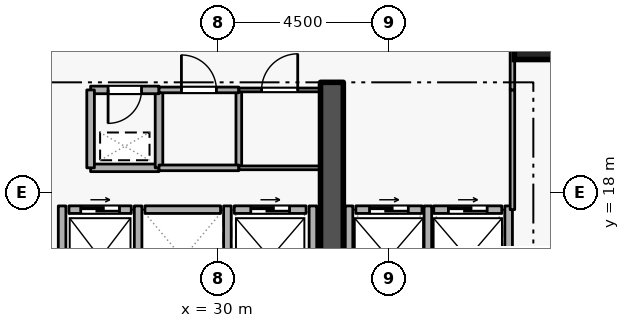
"""IFC4 building model, lengths in metres.
Left out: names, types, materials, properties, quantities, classifications, styles, units other than length and angle.
Written with IfcOpenShell. Run it as: python <this file> out.ifc"""

import sys

from ifc_helpers import new_model, si_unit, direction, frame, frame_2d, origin, origin_2d, place, context, subcontext, project, spatial, rectangle, extrude, element, fill, save


model = new_model("IFC4")
c1 = context("Model", 3, precision=1e-05, world=origin(), true_north=direction((0.0, 1.0)))
c2 = subcontext(c1, "Body", "Model", "MODEL_VIEW")
j1 = project(units=[si_unit("LENGTHUNIT", "METRE"), si_unit("PLANEANGLEUNIT", "RADIAN")], contexts=[c1])
p1 = place(None, origin())
s1 = spatial("IfcSite", under=j1, at=p1, CompositionType="ELEMENT")
p2 = place(p1, origin())
s2 = spatial("IfcBuilding", under=s1, at=p2, CompositionType="ELEMENT")
p3 = place(p2, frame((0.0, 0.0, 64.5)))
s3 = spatial("IfcBuildingStorey", under=s2, at=p3, CompositionType="ELEMENT", Elevation=64.5)
p4 = place(p3, frame((33.0, 15.2, 0.0), z_axis=(0.0, 0.0, 1.0), x_axis=(0.0, 1.0, 0.0)))
e1 = element("IfcWall", 1, at=p4, inside=s3, PredefinedType="SHEAR", context=c2, shape_type="SweptSolid", body=[
    extrude(rectangle(XDim=5.7, YDim=0.6, at=frame_2d((2.85, 0.0))), origin(), (0.0, 0.0, 1.0), 3.6),
])
p5 = place(p3, frame((38.5, 22.2, 0.0), z_axis=(0.0, 0.0, 1.0), x_axis=(1.0, 0.0, 0.0)))
e2 = element("IfcColumn", 2, at=p5, inside=s3, PredefinedType="COLUMN", context=c2, shape_type="SweptSolid", body=[
    extrude(rectangle(XDim=1.4, YDim=1.4, at=origin_2d()), origin(), (0.0, 0.0, 1.0), 3.6),
])
p6 = place(p3, frame((26.08, 17.55, 0.0), z_axis=(0.0, 0.0, 1.0), x_axis=(1.0, 0.0, 0.0)))
e3 = element("IfcWall", 3, at=p6, inside=s3, PredefinedType="STANDARD", context=c2, shape_type="SweptSolid", body=[
    extrude(rectangle(XDim=1.64, YDim=0.2, at=frame_2d((0.82, 0.0))), origin(), (0.0, 0.0, 1.0), 3.34),
])
p7 = place(p6, frame((0.31, 0.0, 0.0)))
e4 = element("IfcOpeningElement", 4, at=p7, cuts=e3, PredefinedType="OPENING", context=c2, shape_type="SweptSolid", body=[
    extrude(rectangle(XDim=1.02, YDim=2.06, at=frame_2d((0.51, 1.03))), frame((0.0, 0.11, 0.0), z_axis=(0.0, -1.0, 0.0), x_axis=(1.0, 0.0, 0.0)), (0.0, 0.0, 1.0), 0.22),
])
p8 = place(p3, frame((28.08, 17.55, 0.0), z_axis=(0.0, 0.0, 1.0), x_axis=(1.0, 0.0, 0.0)))
e5 = element("IfcWall", 5, at=p8, inside=s3, PredefinedType="STANDARD", context=c2, shape_type="SweptSolid", body=[
    extrude(rectangle(XDim=1.99, YDim=0.2, at=frame_2d((0.995, 0.0))), origin(), (0.0, 0.0, 1.0), 3.34),
])
p9 = place(p3, frame((30.43, 17.55, 0.0), z_axis=(0.0, 0.0, 1.0), x_axis=(1.0, 0.0, 0.0)))
e6 = element("IfcWall", 6, at=p9, inside=s3, PredefinedType="STANDARD", context=c2, shape_type="SweptSolid", body=[
    extrude(rectangle(XDim=1.89, YDim=0.2, at=frame_2d((0.945, 0.0))), origin(), (0.0, 0.0, 1.0), 3.34),
])
p10 = place(p9, frame((0.435, 0.0, 0.0)))
e7 = element("IfcOpeningElement", 7, at=p10, cuts=e6, PredefinedType="OPENING", context=c2, shape_type="SweptSolid", body=[
    extrude(rectangle(XDim=1.02, YDim=2.06, at=frame_2d((0.51, 1.03))), frame((0.0, 0.11, 0.0), z_axis=(0.0, -1.0, 0.0), x_axis=(1.0, 0.0, 0.0)), (0.0, 0.0, 1.0), 0.22),
])
p11 = place(p3, frame((33.63, 17.55, 0.0), z_axis=(0.0, 0.0, 1.0), x_axis=(1.0, 0.0, 0.0)))
e8 = element("IfcWall", 8, at=p11, inside=s3, PredefinedType="STANDARD", context=c2, shape_type="SweptSolid", body=[
    extrude(rectangle(XDim=1.74, YDim=0.2, at=frame_2d((0.87, 0.0))), origin(), (0.0, 0.0, 1.0), 3.34),
])
p12 = place(p11, frame((0.36, 0.0, 0.0)))
e9 = element("IfcOpeningElement", 9, at=p12, cuts=e8, PredefinedType="OPENING", context=c2, shape_type="SweptSolid", body=[
    extrude(rectangle(XDim=1.02, YDim=2.06, at=frame_2d((0.51, 1.03))), frame((0.0, 0.11, 0.0), z_axis=(0.0, -1.0, 0.0), x_axis=(1.0, 0.0, 0.0)), (0.0, 0.0, 1.0), 0.22),
])
p13 = place(p3, frame((35.68, 17.55, 0.0), z_axis=(0.0, 0.0, 1.0), x_axis=(1.0, 0.0, 0.0)))
e10 = element("IfcWall", 10, at=p13, inside=s3, PredefinedType="STANDARD", context=c2, shape_type="SweptSolid", body=[
    extrude(rectangle(XDim=1.79, YDim=0.2, at=frame_2d((0.895, 0.0))), origin(), (0.0, 0.0, 1.0), 3.34),
])
p14 = place(p13, frame((0.385, 0.0, 0.0)))
e11 = element("IfcOpeningElement", 11, at=p14, cuts=e10, PredefinedType="OPENING", context=c2, shape_type="SweptSolid", body=[
    extrude(rectangle(XDim=1.02, YDim=2.06, at=frame_2d((0.51, 1.03))), frame((0.0, 0.11, 0.0), z_axis=(0.0, -1.0, 0.0), x_axis=(1.0, 0.0, 0.0)), (0.0, 0.0, 1.0), 0.22),
])
for number, where, z_axis, x_axis in (
    (12, (27.9, 15.212, 0.0), (0.0, 0.0, 1.0), (0.0, 1.0, 0.0)),
    (13, (25.9, 15.212, 0.0), (0.0, 0.0, 1.0), (0.0, 1.0, 0.0)),
    (14, (30.25, 15.212, 0.0), (0.0, 0.0, 1.0), (0.0, 1.0, 0.0)),
    (15, (32.5, 15.212, 0.0), (0.0, 0.0, 1.0), (0.0, 1.0, 0.0)),
):
    element("IfcWall", number, at=place(p3, frame(where, z_axis=z_axis, x_axis=x_axis)), inside=s3, PredefinedType="STANDARD", context=c2, shape_type="SweptSolid", body=[
        extrude(rectangle(XDim=2.436, YDim=0.2, at=frame_2d((1.218, 0.0))), origin(), (0.0, 0.0, 1.0), 3.34),
    ])
for number, where, z_axis, x_axis in (
    (16, (35.525, 15.012, 0.0), (0.0, 0.0, 1.0), (0.0, 1.0, 0.0)),
    (17, (33.45, 15.012, 0.0), (0.0, 0.0, 1.0), (0.0, 1.0, 0.0)),
    (18, (37.65, 15.012, 0.0), (0.0, 0.0, 1.0), (0.0, 1.0, 0.0)),
):
    element("IfcWall", number, at=place(p3, frame(where, z_axis=z_axis, x_axis=x_axis)), inside=s3, PredefinedType="STANDARD", context=c2, shape_type="SweptSolid", body=[
        extrude(rectangle(XDim=2.636, YDim=0.2, at=frame_2d((1.318, 0.0))), origin(), (0.0, 0.0, 1.0), 3.34),
    ])
p15 = place(p3, frame((26.65, 18.65, 0.0), z_axis=(0.0, 0.0, 1.0), x_axis=(1.0, 0.0, 0.0)))
e19 = element("IfcWall", 19, at=p15, inside=s3, PredefinedType="STANDARD", context=c2, shape_type="SweptSolid", body=[
    extrude(rectangle(XDim=1.8, YDim=0.2, at=frame_2d((0.9, 0.0))), origin(), (0.0, 0.0, 1.0), 3.34),
])
p16 = place(p3, frame((28.45, 18.65, 0.0), z_axis=(0.0, 0.0, 1.0), x_axis=(0.0, 1.0, 0.0)))
e20 = element("IfcWall", 20, at=p16, inside=s3, PredefinedType="STANDARD", context=c2, shape_type="SweptSolid", body=[
    extrude(rectangle(XDim=2.05, YDim=0.2, at=frame_2d((1.025, 0.0))), origin(), (0.0, 0.0, 1.0), 3.34),
])
p17 = place(p3, frame((28.45, 20.7, 0.0), z_axis=(0.0, 0.0, 1.0), x_axis=(-1.0, 0.0, 0.0)))
e21 = element("IfcWall", 21, at=p17, inside=s3, PredefinedType="STANDARD", context=c2, shape_type="SweptSolid", body=[
    extrude(rectangle(XDim=1.8, YDim=0.2, at=frame_2d((0.9, 0.0))), origin(), (0.0, 0.0, 1.0), 3.34),
])
p18 = place(p17, frame((0.46, 0.0, 0.0)))
e22 = element("IfcOpeningElement", 22, at=p18, cuts=e21, PredefinedType="OPENING", context=c2, shape_type="SweptSolid", body=[
    extrude(rectangle(XDim=0.88, YDim=2.04, at=frame_2d((0.44, 1.02))), frame((0.0, 0.11, 0.0), z_axis=(0.0, -1.0, 0.0), x_axis=(1.0, 0.0, 0.0)), (0.0, 0.0, 1.0), 0.22),
])
p19 = place(p3, frame((26.65, 20.7, 0.0), z_axis=(0.0, 0.0, 1.0), x_axis=(0.0, -1.0, 0.0)))
e23 = element("IfcWall", 23, at=p19, inside=s3, PredefinedType="STANDARD", context=c2, shape_type="SweptSolid", body=[
    extrude(rectangle(XDim=2.05, YDim=0.2, at=frame_2d((1.025, 0.0))), origin(), (0.0, 0.0, 1.0), 3.34),
])
p20 = place(p3, frame((30.55, 20.7, 0.0), z_axis=(0.0, 0.0, 1.0), x_axis=(0.0, -1.0, 0.0)))
e24 = element("IfcWall", 24, at=p20, inside=s3, PredefinedType="PARTITIONING", context=c2, shape_type="SweptSolid", body=[
    extrude(rectangle(XDim=2.05, YDim=0.15, at=frame_2d((1.025, 0.0))), origin(), (0.0, 0.0, 1.0), 3.34),
])
p21 = place(p3, frame((30.55, 18.65, 0.0), z_axis=(0.0, 0.0, 1.0), x_axis=(-1.0, 0.0, 0.0)))
e25 = element("IfcWall", 25, at=p21, inside=s3, PredefinedType="PARTITIONING", context=c2, shape_type="SweptSolid", body=[
    extrude(rectangle(XDim=2.1, YDim=0.15, at=frame_2d((1.05, 0.0))), origin(), (0.0, 0.0, 1.0), 3.34),
])
p22 = place(p3, frame((28.45, 20.7, 0.0), z_axis=(0.0, 0.0, 1.0), x_axis=(1.0, 0.0, 0.0)))
e26 = element("IfcWall", 26, at=p22, inside=s3, PredefinedType="PARTITIONING", context=c2, shape_type="SweptSolid", body=[
    extrude(rectangle(XDim=2.1, YDim=0.15, at=frame_2d((1.05, 0.0))), origin(), (0.0, 0.0, 1.0), 3.34),
])
p23 = place(p22, frame((0.59, 0.0, 0.0)))
e27 = element("IfcOpeningElement", 27, at=p23, cuts=e26, PredefinedType="OPENING", context=c2, shape_type="SweptSolid", body=[
    extrude(rectangle(XDim=0.92, YDim=2.08, at=frame_2d((0.46, 1.04))), frame((0.0, 0.085, 0.0), z_axis=(0.0, -1.0, 0.0), x_axis=(1.0, 0.0, 0.0)), (0.0, 0.0, 1.0), 0.17),
])
p24 = place(p3, frame((32.7, 18.65, 0.0), z_axis=(0.0, 0.0, 1.0), x_axis=(-1.0, 0.0, 0.0)))
e28 = element("IfcWall", 28, at=p24, inside=s3, PredefinedType="PARTITIONING", context=c2, shape_type="SweptSolid", body=[
    extrude(rectangle(XDim=2.15, YDim=0.1, at=frame_2d((1.075, 0.0))), origin(), (0.0, 0.0, 1.0), 3.34),
])
p25 = place(p3, frame((30.55, 20.7, 0.0), z_axis=(0.0, 0.0, 1.0), x_axis=(1.0, 0.0, 0.0)))
e29 = element("IfcWall", 29, at=p25, inside=s3, PredefinedType="PARTITIONING", context=c2, shape_type="SweptSolid", body=[
    extrude(rectangle(XDim=2.15, YDim=0.1, at=frame_2d((1.075, 0.0))), origin(), (0.0, 0.0, 1.0), 3.34),
])
p26 = place(p25, frame((0.6, 0.0, 0.0)))
e30 = element("IfcOpeningElement", 30, at=p26, cuts=e29, PredefinedType="OPENING", context=c2, shape_type="SweptSolid", body=[
    extrude(rectangle(XDim=0.95, YDim=2.1, at=frame_2d((0.475, 1.05))), frame((0.0, 0.06, 0.0), z_axis=(0.0, -1.0, 0.0), x_axis=(1.0, 0.0, 0.0)), (0.0, 0.0, 1.0), 0.12),
])
p27 = place(p3, frame((37.75, 17.55, 0.0), z_axis=(0.0, 0.0, 1.0), x_axis=(0.0, 1.0, 0.0)))
e31 = element("IfcWall", 31, at=p27, inside=s3, PredefinedType="PARTITIONING", context=c2, shape_type="SweptSolid", body=[
    extrude(rectangle(XDim=3.15, YDim=0.12, at=frame_2d((1.575, 0.0))), origin(), (0.0, 0.0, 1.0), 3.34),
])
p28 = place(p3, frame((37.75, 20.7, 0.0), z_axis=(0.0, 0.0, 1.0), x_axis=(0.0, 1.0, 0.0)))
e32 = element("IfcWall", 32, at=p28, inside=s3, PredefinedType="PARTITIONING", context=c2, shape_type="SweptSolid", body=[
    extrude(rectangle(XDim=1.85, YDim=0.12, at=frame_2d((0.925, 0.0))), origin(), (0.0, 0.0, 1.0), 3.34),
])
p29 = place(p7, origin())
e33 = element("IfcDoor", 33, at=p29, inside=s3, OperationType="SLIDING_TO_LEFT", PredefinedType="DOOR", context=c2, shape_type="SweptSolid", body=[
    extrude(rectangle(XDim=1.02, YDim=2.06, at=frame_2d((0.51, 1.03))), frame((0.0, 0.025, 0.0), z_axis=(0.0, -1.0, 0.0), x_axis=(1.0, 0.0, 0.0)), (0.0, 0.0, 1.0), 0.05),
])
fill(e4, e33)
p30 = place(p10, origin())
e34 = element("IfcDoor", 34, at=p30, inside=s3, OperationType="SLIDING_TO_LEFT", PredefinedType="DOOR", context=c2, shape_type="SweptSolid", body=[
    extrude(rectangle(XDim=1.02, YDim=2.06, at=frame_2d((0.51, 1.03))), frame((0.0, 0.025, 0.0), z_axis=(0.0, -1.0, 0.0), x_axis=(1.0, 0.0, 0.0)), (0.0, 0.0, 1.0), 0.05),
])
fill(e7, e34)
p31 = place(p12, origin())
e35 = element("IfcDoor", 35, at=p31, inside=s3, OperationType="SLIDING_TO_LEFT", PredefinedType="DOOR", context=c2, shape_type="SweptSolid", body=[
    extrude(rectangle(XDim=1.02, YDim=2.06, at=frame_2d((0.51, 1.03))), frame((0.0, 0.025, 0.0), z_axis=(0.0, -1.0, 0.0), x_axis=(1.0, 0.0, 0.0)), (0.0, 0.0, 1.0), 0.05),
])
fill(e9, e35)
p32 = place(p14, origin())
e36 = element("IfcDoor", 36, at=p32, inside=s3, OperationType="SLIDING_TO_LEFT", PredefinedType="DOOR", context=c2, shape_type="SweptSolid", body=[
    extrude(rectangle(XDim=1.02, YDim=2.06, at=frame_2d((0.51, 1.03))), frame((0.0, 0.025, 0.0), z_axis=(0.0, -1.0, 0.0), x_axis=(1.0, 0.0, 0.0)), (0.0, 0.0, 1.0), 0.05),
])
fill(e11, e36)
p33 = place(p18, origin())
e37 = element("IfcDoor", 37, at=p33, inside=s3, OperationType="SINGLE_SWING_RIGHT", PredefinedType="DOOR", context=c2, shape_type="SweptSolid", body=[
    extrude(rectangle(XDim=0.88, YDim=2.04, at=frame_2d((0.44, 1.02))), frame((0.0, 0.025, 0.0), z_axis=(0.0, -1.0, 0.0), x_axis=(1.0, 0.0, 0.0)), (0.0, 0.0, 1.0), 0.05),
])
fill(e22, e37)
p34 = place(p23, origin())
e38 = element("IfcDoor", 38, at=p34, inside=s3, OperationType="SINGLE_SWING_LEFT", PredefinedType="DOOR", context=c2, shape_type="SweptSolid", body=[
    extrude(rectangle(XDim=0.92, YDim=2.08, at=frame_2d((0.46, 1.04))), frame((0.0, 0.025, 0.0), z_axis=(0.0, -1.0, 0.0), x_axis=(1.0, 0.0, 0.0)), (0.0, 0.0, 1.0), 0.05),
])
fill(e27, e38)
p35 = place(p26, origin())
e39 = element("IfcDoor", 39, at=p35, inside=s3, OperationType="SINGLE_SWING_RIGHT", PredefinedType="DOOR", context=c2, shape_type="SweptSolid", body=[
    extrude(rectangle(XDim=0.95, YDim=2.1, at=frame_2d((0.475, 1.05))), frame((0.0, 0.025, 0.0), z_axis=(0.0, -1.0, 0.0), x_axis=(1.0, 0.0, 0.0)), (0.0, 0.0, 1.0), 0.05),
])
fill(e30, e39)
save(model, sys.argv[1])
